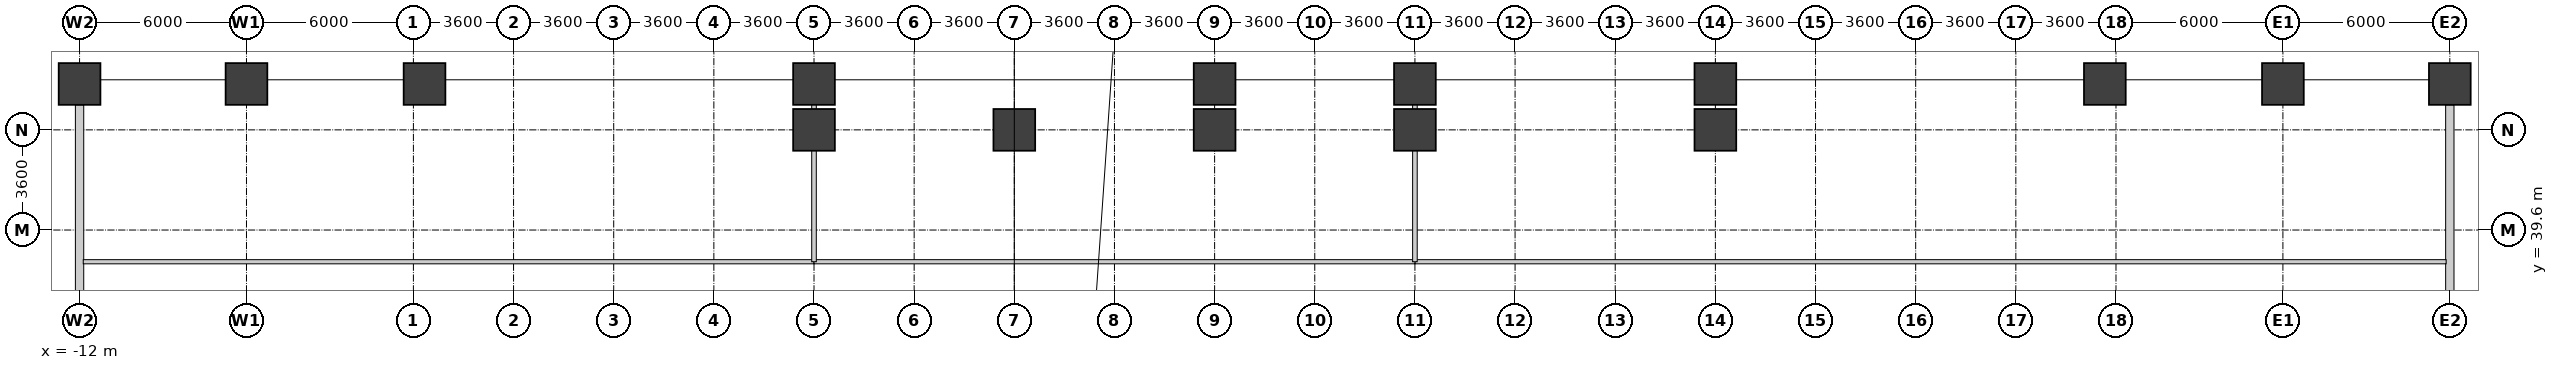
"""IFC4 building model, lengths in metres.
Left out: names, types, materials, properties, quantities, classifications, styles, units other than length and angle.
Written with IfcOpenShell. Run it as: python <this file> out.ifc"""

import sys

from ifc_helpers import new_model, si_unit, direction, frame, frame_2d, origin, origin_2d, place, context, subcontext, project, spatial, rectangle, extrude, source, transform, mapped, element, fill, save


model = new_model("IFC4")
c1 = context("Model", 3, precision=1e-05, world=origin(), true_north=direction((0.0, 1.0)))
c2 = subcontext(c1, "Body", "Model", "MODEL_VIEW")
j1 = project(units=[si_unit("LENGTHUNIT", "METRE"), si_unit("PLANEANGLEUNIT", "RADIAN")], contexts=[c1])
p1 = place(None, origin())
s1 = spatial("IfcSite", under=j1, at=p1, CompositionType="ELEMENT")
p2 = place(p1, origin())
s2 = spatial("IfcBuilding", under=s1, at=p2, CompositionType="ELEMENT")
p3 = place(p2, origin())
s3 = spatial("IfcBuildingStorey", under=s2, at=p3, CompositionType="ELEMENT", Elevation=0.0)
m1 = source(origin(), c2, "Body", "SweptSolid", [
    extrude(rectangle(XDim=1.5, YDim=1.5, at=origin_2d()), origin(), (0.0, 0.0, 1.0), 5.4),
])
for number, where, z_axis, x_axis in (
    (1, (14.4, 43.2, 0.0), (0.0, 0.0, 1.0), (1.0, 0.0, 0.0)),
    (2, (21.6, 43.2, 0.0), (0.0, 0.0, 1.0), (1.0, 0.0, 0.0)),
    (3, (28.8, 43.2, 0.0), (0.0, 0.0, 1.0), (1.0, 0.0, 0.0)),
    (4, (36.0, 43.2, 0.0), (0.0, 0.0, 1.0), (1.0, 0.0, 0.0)),
    (5, (46.8, 43.2, 0.0), (0.0, 0.0, 1.0), (1.0, 0.0, 0.0)),
    (6, (0.4, 44.85, 0.0), (0.0, 0.0, 1.0), (1.0, 0.0, 0.0)),
    (7, (14.4, 44.85, 0.0), (0.0, 0.0, 1.0), (1.0, 0.0, 0.0)),
    (8, (28.8, 44.85, 0.0), (0.0, 0.0, 1.0), (1.0, 0.0, 0.0)),
    (9, (36.0, 44.85, 0.0), (0.0, 0.0, 1.0), (1.0, 0.0, 0.0)),
    (10, (46.8, 44.85, 0.0), (0.0, 0.0, 1.0), (1.0, 0.0, 0.0)),
    (11, (60.8, 44.85, 0.0), (0.0, 0.0, 1.0), (1.0, 0.0, 0.0)),
    (12, (-12.0, 44.85, 0.0), (0.0, 0.0, 1.0), (1.0, 0.0, 0.0)),
    (13, (-6.0, 44.85, 0.0), (0.0, 0.0, 1.0), (1.0, 0.0, 0.0)),
    (14, (67.2, 44.85, 0.0), (0.0, 0.0, 1.0), (1.0, 0.0, 0.0)),
    (15, (73.2, 44.85, 0.0), (0.0, 0.0, 1.0), (1.0, 0.0, 0.0)),
):
    element("IfcColumn", number, at=place(p3, frame(where, z_axis=z_axis, x_axis=x_axis)), inside=s3, PredefinedType="COLUMN", context=c2, shape_type="MappedRepresentation", body=[
        mapped(m1, transform((0.0, 0.0, 0.0), x_axis=(1.0, 0.0, 0.0), y_axis=(0.0, 1.0, 0.0), z_axis=(0.0, 0.0, 1.0), scale=1.0)),
    ])
p4 = place(p3, frame((73.2, 44.099, 0.0), z_axis=(0.0, 0.0, 1.0), x_axis=(0.0, -1.0, 0.0)))
e16 = element("IfcWall", 16, at=p4, inside=s3, PredefinedType="STANDARD", context=c2, shape_type="SweptSolid", body=[
    extrude(rectangle(XDim=7.198, YDim=0.3, at=frame_2d((3.599, 0.0))), origin(), (0.0, 0.0, 1.0), 4.5),
])
p5 = place(p4, frame((0.6, 0.0, 0.9)))
e17 = element("IfcOpeningElement", 17, at=p5, cuts=e16, PredefinedType="OPENING", context=c2, shape_type="SweptSolid", body=[
    extrude(rectangle(XDim=2.4, YDim=2.5, at=frame_2d((1.2, 1.25))), frame((0.0, 0.16, 0.0), z_axis=(0.0, -1.0, 0.0), x_axis=(1.0, 0.0, 0.0)), (0.0, 0.0, 1.0), 0.32),
])
p6 = place(p4, frame((3.7, 0.0, 0.9)))
e18 = element("IfcOpeningElement", 18, at=p6, cuts=e16, PredefinedType="OPENING", context=c2, shape_type="SweptSolid", body=[
    extrude(rectangle(XDim=0.95, YDim=1.75, at=frame_2d((0.475, 0.875))), frame((0.0, 0.16, 0.0), z_axis=(0.0, -1.0, 0.0), x_axis=(1.0, 0.0, 0.0)), (0.0, 0.0, 1.0), 0.32),
])
p7 = place(p3, frame((-12.0, 36.901, 0.0), z_axis=(0.0, 0.0, 1.0), x_axis=(0.0, 1.0, 0.0)))
e19 = element("IfcWall", 19, at=p7, inside=s3, PredefinedType="STANDARD", context=c2, shape_type="SweptSolid", body=[
    extrude(rectangle(XDim=7.198, YDim=0.3, at=frame_2d((3.599, 0.0))), origin(), (0.0, 0.0, 1.0), 4.5),
])
p8 = place(p7, frame((4.198, 0.0, 0.9)))
e20 = element("IfcOpeningElement", 20, at=p8, cuts=e19, PredefinedType="OPENING", context=c2, shape_type="SweptSolid", body=[
    extrude(rectangle(XDim=2.4, YDim=2.5, at=frame_2d((1.2, 1.25))), frame((0.0, 0.16, 0.0), z_axis=(0.0, -1.0, 0.0), x_axis=(1.0, 0.0, 0.0)), (0.0, 0.0, 1.0), 0.32),
])
p9 = place(p7, frame((2.548, 0.0, 0.9)))
e21 = element("IfcOpeningElement", 21, at=p9, cuts=e19, PredefinedType="OPENING", context=c2, shape_type="SweptSolid", body=[
    extrude(rectangle(XDim=0.95, YDim=1.75, at=frame_2d((0.475, 0.875))), frame((0.0, 0.16, 0.0), z_axis=(0.0, -1.0, 0.0), x_axis=(1.0, 0.0, 0.0)), (0.0, 0.0, 1.0), 0.32),
])
p10 = place(p3, frame((36.0, 38.46, 0.0), z_axis=(0.0, 0.0, 1.0), x_axis=(1.0, 0.0, 0.0)))
e22 = element("IfcWall", 22, at=p10, inside=s3, PredefinedType="PARTITIONING", context=c2, shape_type="SweptSolid", body=[
    extrude(rectangle(XDim=37.068, YDim=0.15, at=frame_2d((18.534, 0.0))), origin(), (0.0, 0.0, 1.0), 5.1),
])
p11 = place(p10, frame((17.884, 0.0, 0.0)))
e23 = element("IfcOpeningElement", 23, at=p11, cuts=e22, PredefinedType="OPENING", context=c2, shape_type="SweptSolid", body=[
    extrude(rectangle(XDim=1.3, YDim=2.12, at=frame_2d((0.65, 1.06))), frame((0.0, 0.085, 0.0), z_axis=(0.0, -1.0, 0.0), x_axis=(1.0, 0.0, 0.0)), (0.0, 0.0, 1.0), 0.17),
])
p12 = place(p3, frame((-11.868, 38.46, 0.0), z_axis=(0.0, 0.0, 1.0), x_axis=(1.0, 0.0, 0.0)))
e24 = element("IfcWall", 24, at=p12, inside=s3, PredefinedType="PARTITIONING", context=c2, shape_type="SweptSolid", body=[
    extrude(rectangle(XDim=26.268, YDim=0.15, at=frame_2d((13.134, 0.0))), origin(), (0.0, 0.0, 1.0), 5.1),
])
p13 = place(p12, frame((12.484, 0.0, 0.0)))
e25 = element("IfcOpeningElement", 25, at=p13, cuts=e24, PredefinedType="OPENING", context=c2, shape_type="SweptSolid", body=[
    extrude(rectangle(XDim=1.3, YDim=2.12, at=frame_2d((0.65, 1.06))), frame((0.0, 0.085, 0.0), z_axis=(0.0, -1.0, 0.0), x_axis=(1.0, 0.0, 0.0)), (0.0, 0.0, 1.0), 0.17),
])
p14 = place(p3, frame((14.4, 38.46, 0.0), z_axis=(0.0, 0.0, 1.0), x_axis=(1.0, 0.0, 0.0)))
e26 = element("IfcWall", 26, at=p14, inside=s3, PredefinedType="PARTITIONING", context=c2, shape_type="SweptSolid", body=[
    extrude(rectangle(XDim=21.6, YDim=0.15, at=frame_2d((10.8, 0.0))), origin(), (0.0, 0.0, 1.0), 5.1),
])
p15 = place(p14, frame((10.15, 0.0, 0.0)))
e27 = element("IfcOpeningElement", 27, at=p15, cuts=e26, PredefinedType="OPENING", context=c2, shape_type="SweptSolid", body=[
    extrude(rectangle(XDim=1.3, YDim=2.12, at=frame_2d((0.65, 1.06))), frame((0.0, 0.085, 0.0), z_axis=(0.0, -1.0, 0.0), x_axis=(1.0, 0.0, 0.0)), (0.0, 0.0, 1.0), 0.17),
])
for number, where, z_axis, x_axis in (
    (28, (14.4, 38.46, 0.0), (0.0, 0.0, 1.0), (0.0, 1.0, 0.0)),
    (29, (36.0, 38.46, 0.0), (0.0, 0.0, 1.0), (0.0, 1.0, 0.0)),
):
    element("IfcWall", number, at=place(p3, frame(where, z_axis=z_axis, x_axis=x_axis)), inside=s3, PredefinedType="PARTITIONING", context=c2, shape_type="SweptSolid", body=[
        extrude(rectangle(XDim=6.408, YDim=0.165, at=frame_2d((3.204, 0.0))), origin(), (0.0, 0.0, 1.0), 4.5),
    ])
p16 = place(p5, origin())
e30 = element("IfcWindow", 30, at=p16, inside=s3, PartitioningType="SINGLE_PANEL", PredefinedType="WINDOW", context=c2, shape_type="SweptSolid", body=[
    extrude(rectangle(XDim=2.4, YDim=2.5, at=frame_2d((1.2, 1.25))), frame((0.0, 0.03, 0.0), z_axis=(0.0, -1.0, 0.0), x_axis=(1.0, 0.0, 0.0)), (0.0, 0.0, 1.0), 0.06),
])
fill(e17, e30)
p17 = place(p6, origin())
e31 = element("IfcWindow", 31, at=p17, inside=s3, PartitioningType="SINGLE_PANEL", PredefinedType="WINDOW", context=c2, shape_type="SweptSolid", body=[
    extrude(rectangle(XDim=0.95, YDim=1.75, at=frame_2d((0.475, 0.875))), frame((0.0, 0.03, 0.0), z_axis=(0.0, -1.0, 0.0), x_axis=(1.0, 0.0, 0.0)), (0.0, 0.0, 1.0), 0.06),
])
fill(e18, e31)
p18 = place(p8, origin())
e32 = element("IfcWindow", 32, at=p18, inside=s3, PartitioningType="SINGLE_PANEL", PredefinedType="WINDOW", context=c2, shape_type="SweptSolid", body=[
    extrude(rectangle(XDim=2.4, YDim=2.5, at=frame_2d((1.2, 1.25))), frame((0.0, 0.03, 0.0), z_axis=(0.0, -1.0, 0.0), x_axis=(1.0, 0.0, 0.0)), (0.0, 0.0, 1.0), 0.06),
])
fill(e20, e32)
p19 = place(p9, origin())
e33 = element("IfcWindow", 33, at=p19, inside=s3, PartitioningType="SINGLE_PANEL", PredefinedType="WINDOW", context=c2, shape_type="SweptSolid", body=[
    extrude(rectangle(XDim=0.95, YDim=1.75, at=frame_2d((0.475, 0.875))), frame((0.0, 0.03, 0.0), z_axis=(0.0, -1.0, 0.0), x_axis=(1.0, 0.0, 0.0)), (0.0, 0.0, 1.0), 0.06),
])
fill(e21, e33)
p20 = place(p11, origin())
e34 = element("IfcDoor", 34, at=p20, inside=s3, OperationType="DOUBLE_DOOR_SINGLE_SWING", PredefinedType="DOOR", context=c2, shape_type="SweptSolid", body=[
    extrude(rectangle(XDim=1.3, YDim=2.12, at=frame_2d((0.65, 1.06))), frame((0.0, 0.025, 0.0), z_axis=(0.0, -1.0, 0.0), x_axis=(1.0, 0.0, 0.0)), (0.0, 0.0, 1.0), 0.05),
])
fill(e23, e34)
p21 = place(p13, origin())
e35 = element("IfcDoor", 35, at=p21, inside=s3, OperationType="DOUBLE_DOOR_SINGLE_SWING", PredefinedType="DOOR", context=c2, shape_type="SweptSolid", body=[
    extrude(rectangle(XDim=1.3, YDim=2.12, at=frame_2d((0.65, 1.06))), frame((0.0, 0.025, 0.0), z_axis=(0.0, -1.0, 0.0), x_axis=(1.0, 0.0, 0.0)), (0.0, 0.0, 1.0), 0.05),
])
fill(e25, e35)
p22 = place(p15, origin())
e36 = element("IfcDoor", 36, at=p22, inside=s3, OperationType="DOUBLE_DOOR_SINGLE_SWING", PredefinedType="DOOR", context=c2, shape_type="SweptSolid", body=[
    extrude(rectangle(XDim=1.3, YDim=2.12, at=frame_2d((0.65, 1.06))), frame((0.0, 0.025, 0.0), z_axis=(0.0, -1.0, 0.0), x_axis=(1.0, 0.0, 0.0)), (0.0, 0.0, 1.0), 0.05),
])
fill(e27, e36)
save(model, sys.argv[1])
